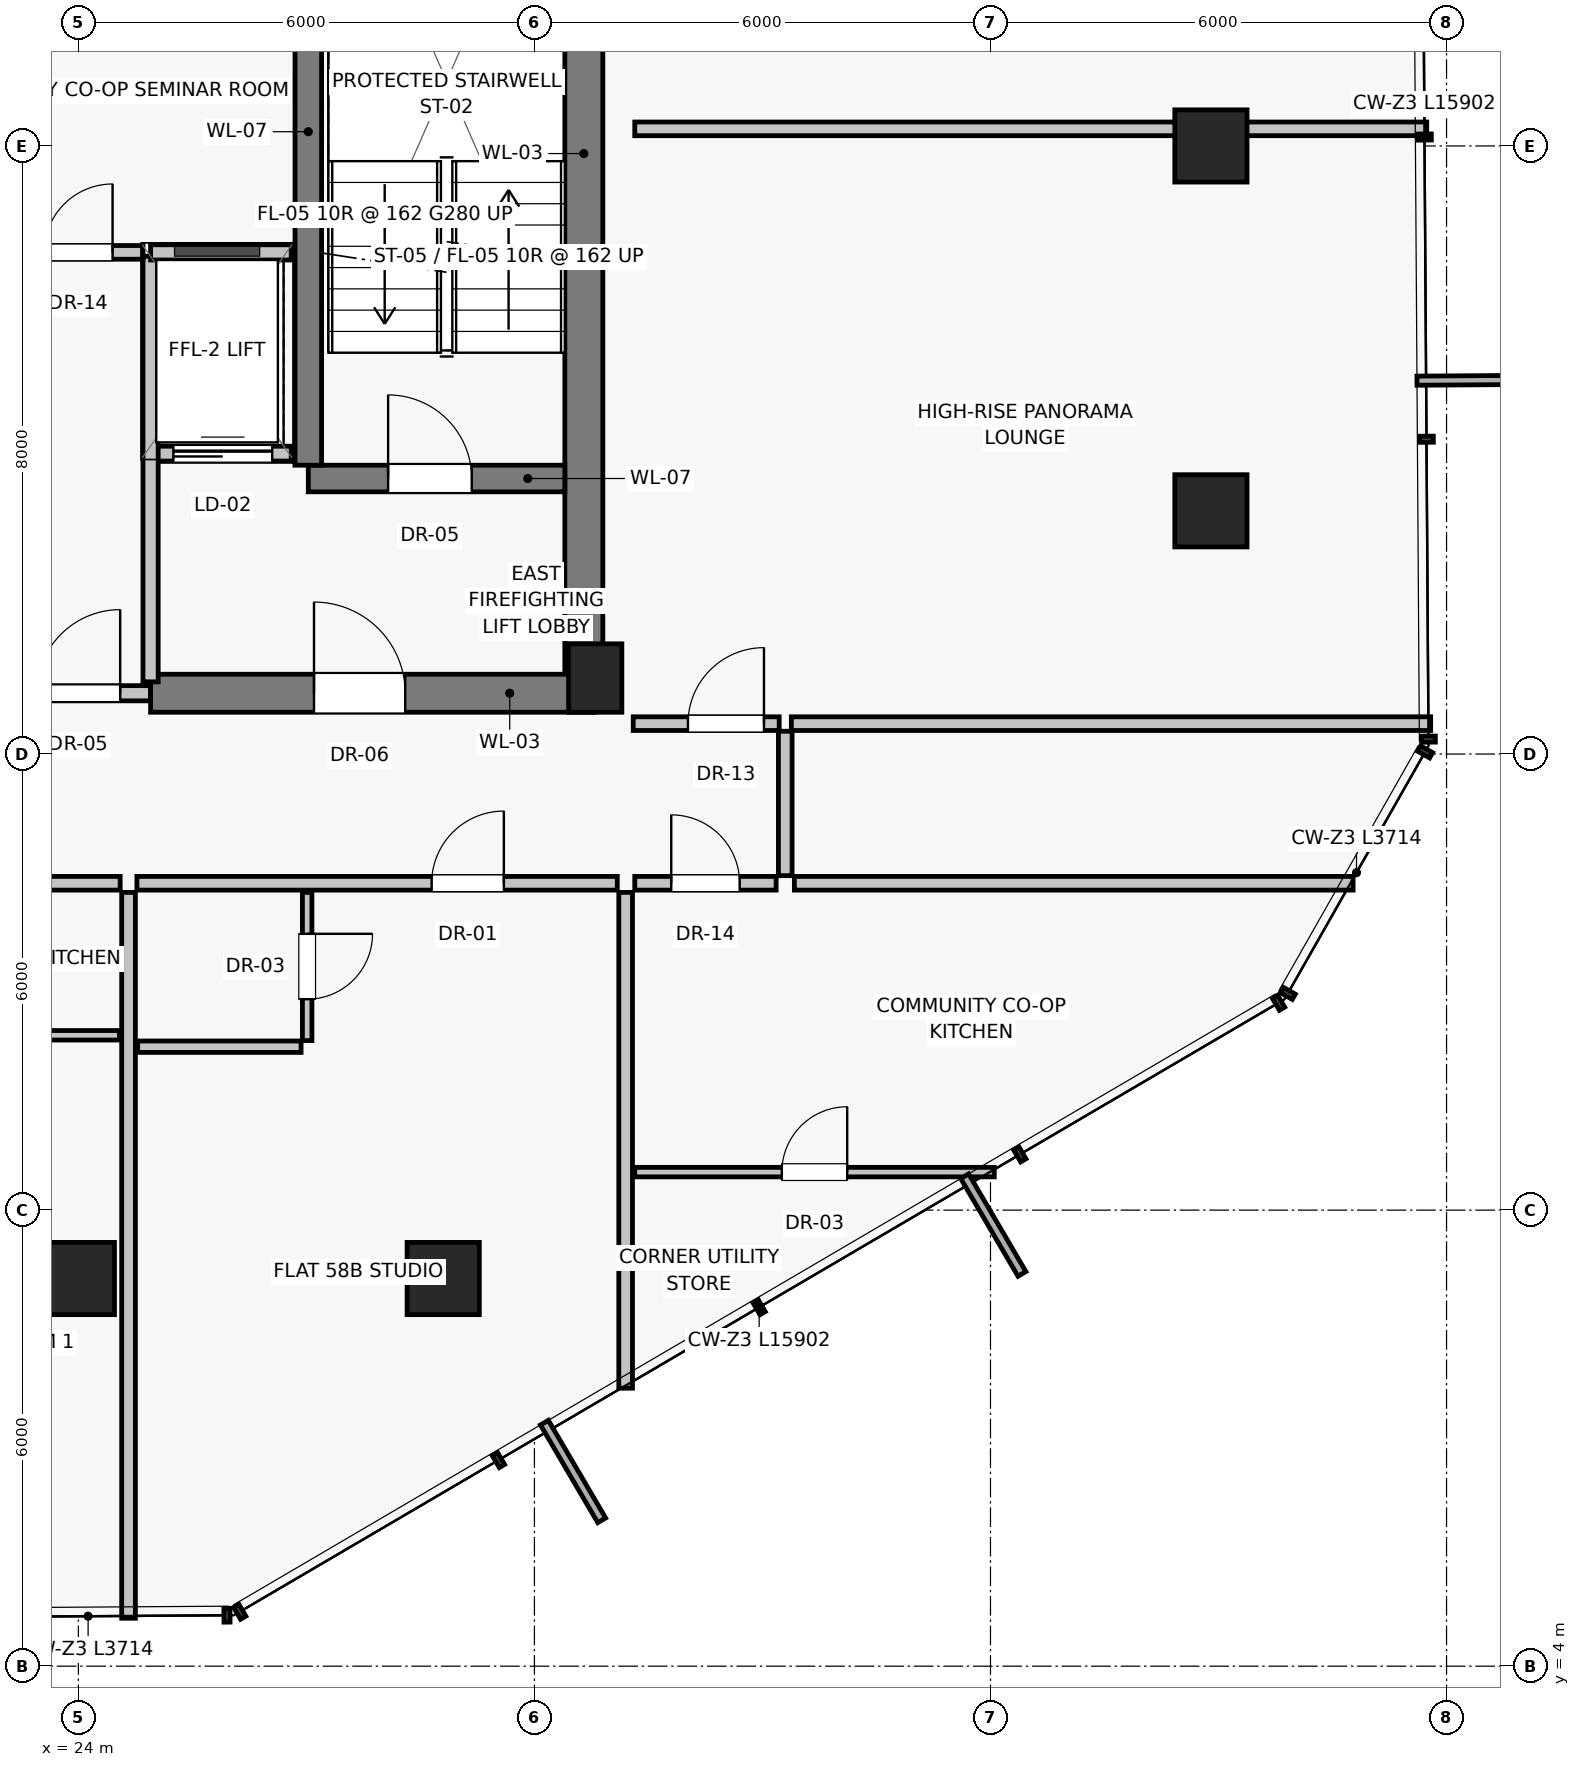
"""IFC4 building model, lengths in metres.
Left out: names, types, materials, properties, quantities, classifications, styles, units other than length and angle.
Written with IfcOpenShell. Run it as: python <this file> out.ifc"""

import sys

from ifc_helpers import new_model, si_unit, direction, frame, frame_2d, origin, origin_2d, place, context, subcontext, project, spatial, rectangle, extrude, source, transform, mapped, element, fill, save


model = new_model("IFC4")
c1 = context("Model", 3, precision=1e-05, world=origin(), true_north=direction((0.0, 1.0)))
c2 = subcontext(c1, "Body", "Model", "MODEL_VIEW")
j1 = project(units=[si_unit("LENGTHUNIT", "METRE"), si_unit("PLANEANGLEUNIT", "RADIAN")], contexts=[c1])
p1 = place(None, origin())
s1 = spatial("IfcSite", under=j1, at=p1, CompositionType="ELEMENT")
p2 = place(p1, origin())
s2 = spatial("IfcBuilding", under=s1, at=p2, CompositionType="ELEMENT")
p3 = place(p2, frame((0.0, 0.0, 204.85)))
s3 = spatial("IfcBuildingStorey", under=s2, at=p3, CompositionType="ELEMENT", Elevation=204.85)
p4 = place(p3, frame((30.8, 17.0, 0.0), z_axis=(0.0, 0.0, 1.0), x_axis=(1.0, 0.0, 0.0)))
e1 = element("IfcColumn", 1, at=p4, inside=s3, PredefinedType="PILASTER", context=c2, shape_type="SweptSolid", body=[
    extrude(rectangle(XDim=0.7, YDim=0.9, at=origin_2d()), origin(), (0.0, 0.0, 1.0), 3.25),
])
for number, where, z_axis, x_axis in (
    (2, (38.9, 19.2, 0.0), (0.0, 0.0, 1.0), (1.0, 0.0, 0.0)),
    (3, (38.9, 24.0, 0.0), (0.0, 0.0, 1.0), (1.0, 0.0, 0.0)),
    (4, (24.0, 9.1, 0.0), (0.0, 0.0, 1.0), (1.0, 0.0, 0.0)),
    (5, (28.8, 9.1, 0.0), (0.0, 0.0, 1.0), (1.0, 0.0, 0.0)),
):
    element("IfcColumn", number, at=place(p3, frame(where, z_axis=z_axis, x_axis=x_axis)), inside=s3, PredefinedType="COLUMN", context=c2, shape_type="SweptSolid", body=[
        extrude(rectangle(XDim=0.95, YDim=0.95, at=origin_2d()), origin(), (0.0, 0.0, 1.0), 3.25),
    ])
p5 = place(p3, frame((30.65, 16.8, 0.0), z_axis=(0.0, 0.0, 1.0), x_axis=(0.0, 1.0, 0.0)))
e6 = element("IfcWall", 6, at=p5, inside=s3, PredefinedType="SHEAR", context=c2, shape_type="SweptSolid", body=[
    extrude(rectangle(XDim=14.2, YDim=0.5, at=frame_2d((7.1, 0.0))), origin(), (0.0, 0.0, 1.0), 3.015),
])
p6 = place(p3, frame((23.05, 16.8, 0.0), z_axis=(0.0, 0.0, 1.0), x_axis=(1.0, 0.0, 0.0)))
e7 = element("IfcWall", 7, at=p6, inside=s3, PredefinedType="SOLIDWALL", context=c2, shape_type="SweptSolid", body=[
    extrude(rectangle(XDim=1.9, YDim=0.2, at=frame_2d((0.95, 0.0))), origin(), (0.0, 0.0, 1.0), 2.165),
])
p7 = place(p6, frame((0.4, 0.0, 0.0)))
e8 = element("IfcOpeningElement", 8, at=p7, cuts=e7, PredefinedType="OPENING", context=c2, shape_type="SweptSolid", body=[
    extrude(rectangle(XDim=1.1, YDim=2.03, at=frame_2d((0.55, 1.015))), frame((0.0, 0.11, 0.0), z_axis=(0.0, -1.0, 0.0), x_axis=(1.0, 0.0, 0.0)), (0.0, 0.0, 1.0), 0.22),
])
p8 = place(p3, frame((24.95, 16.8, 0.0), z_axis=(0.0, 0.0, 1.0), x_axis=(1.0, 0.0, 0.0)))
e9 = element("IfcWall", 9, at=p8, inside=s3, PredefinedType="SHEAR", context=c2, shape_type="SweptSolid", body=[
    extrude(rectangle(XDim=5.85, YDim=0.5, at=frame_2d((2.925, 0.0))), origin(), (0.0, 0.0, 1.0), 3.015),
])
p9 = place(p8, frame((2.15, 0.0, 0.0)))
e10 = element("IfcOpeningElement", 10, at=p9, cuts=e9, PredefinedType="OPENING", context=c2, shape_type="SweptSolid", body=[
    extrude(rectangle(XDim=1.2, YDim=2.03, at=frame_2d((0.6, 1.015))), frame((0.0, 0.26, 0.0), z_axis=(0.0, -1.0, 0.0), x_axis=(1.0, 0.0, 0.0)), (0.0, 0.0, 1.0), 0.52),
])
p10 = place(p3, frame((24.95, 19.95, 0.0), z_axis=(0.0, 0.0, 1.0), x_axis=(1.0, 0.0, 0.0)))
e11 = element("IfcWall", 11, at=p10, inside=s3, PredefinedType="SOLIDWALL", context=c2, shape_type="SweptSolid", body=[
    extrude(rectangle(XDim=1.85, YDim=0.2, at=frame_2d((0.925, 0.0))), origin(), (0.0, 0.0, 1.0), 3.015),
])
p11 = place(p10, frame((0.3, 0.0, 0.0)))
e12 = element("IfcOpeningElement", 12, at=p11, cuts=e11, PredefinedType="OPENING", context=c2, shape_type="SweptSolid", body=[
    extrude(rectangle(XDim=1.3, YDim=2.25, at=frame_2d((0.65, 1.125))), frame((0.0, 0.11, 0.0), z_axis=(0.0, -1.0, 0.0), x_axis=(1.0, 0.0, 0.0)), (0.0, 0.0, 1.0), 0.22),
])
p12 = place(p3, frame((27.025, 19.625, 0.0), z_axis=(0.0, 0.0, 1.0), x_axis=(1.0, 0.0, 0.0)))
e13 = element("IfcWall", 13, at=p12, inside=s3, PredefinedType="SHEAR", context=c2, shape_type="SweptSolid", body=[
    extrude(rectangle(XDim=3.375, YDim=0.35, at=frame_2d((1.688, 0.0))), origin(), (0.0, 0.0, 1.0), 3.015),
])
p13 = place(p12, frame((1.05, 0.0, 0.0)))
e14 = element("IfcOpeningElement", 14, at=p13, cuts=e13, PredefinedType="OPENING", context=c2, shape_type="SweptSolid", body=[
    extrude(rectangle(XDim=1.1, YDim=2.03, at=frame_2d((0.55, 1.015))), frame((0.0, 0.185, 0.0), z_axis=(0.0, -1.0, 0.0), x_axis=(1.0, 0.0, 0.0)), (0.0, 0.0, 1.0), 0.37),
])
p14 = place(p3, frame((27.025, 19.8, 0.0), z_axis=(0.0, 0.0, 1.0), x_axis=(0.0, 1.0, 0.0)))
e15 = element("IfcWall", 15, at=p14, inside=s3, PredefinedType="SHEAR", context=c2, shape_type="SweptSolid", body=[
    extrude(rectangle(XDim=8.775, YDim=0.35, at=frame_2d((4.387, 0.0))), origin(), (0.0, 0.0, 1.0), 3.015),
])
p15 = place(p3, frame((24.95, 16.95, 0.0), z_axis=(0.0, 0.0, 1.0), x_axis=(0.0, 1.0, 0.0)))
e16 = element("IfcWall", 16, at=p15, inside=s3, PredefinedType="SOLIDWALL", context=c2, shape_type="SweptSolid", body=[
    extrude(rectangle(XDim=5.6, YDim=0.2, at=frame_2d((2.8, 0.0))), origin(), (0.0, 0.0, 1.0), 3.015),
])
p16 = place(p3, frame((24.95, 22.6, 0.0), z_axis=(0.0, 0.0, 1.0), x_axis=(1.0, 0.0, 0.0)))
e17 = element("IfcWall", 17, at=p16, inside=s3, PredefinedType="SOLIDWALL", context=c2, shape_type="SweptSolid", body=[
    extrude(rectangle(XDim=1.85, YDim=0.2, at=frame_2d((0.925, 0.0))), origin(), (0.0, 0.0, 1.0), 3.015),
])
p17 = place(p3, frame((23.15, 22.6, 0.0), z_axis=(0.0, 0.0, 1.0), x_axis=(1.0, 0.0, 0.0)))
e18 = element("IfcWall", 18, at=p17, inside=s3, PredefinedType="PARTITIONING", context=c2, shape_type="SweptSolid", body=[
    extrude(rectangle(XDim=1.7, YDim=0.18, at=frame_2d((0.85, 0.0))), origin(), (0.0, 0.0, 1.0), 3.015),
])
p18 = place(p17, frame((0.4, 0.0, 0.0)))
e19 = element("IfcOpeningElement", 19, at=p18, cuts=e18, PredefinedType="OPENING", context=c2, shape_type="SweptSolid", body=[
    extrude(rectangle(XDim=0.9, YDim=2.01, at=frame_2d((0.45, 1.005))), frame((0.0, 0.1, 0.0), z_axis=(0.0, -1.0, 0.0), x_axis=(1.0, 0.0, 0.0)), (0.0, 0.0, 1.0), 0.2),
])
p19 = place(p3, frame((31.2, 14.18, 0.0), z_axis=(0.0, 0.0, 1.0), x_axis=(0.0, -1.0, 0.0)))
e20 = element("IfcWall", 20, at=p19, inside=s3, PredefinedType="PARTITIONING", context=c2, shape_type="SweptSolid", body=[
    extrude(rectangle(XDim=6.523, YDim=0.18, at=frame_2d((3.261, 0.0))), origin(), (0.0, 0.0, 1.0), 3.015),
])
p20 = place(p3, frame((15.31, 14.3, 0.0), z_axis=(0.0, 0.0, 1.0), x_axis=(1.0, 0.0, 0.0)))
e21 = element("IfcWall", 21, at=p20, inside=s3, PredefinedType="PARTITIONING", context=c2, shape_type="SweptSolid", body=[
    extrude(rectangle(XDim=9.24, YDim=0.18, at=frame_2d((4.62, 0.0))), origin(), (0.0, 0.0, 1.0), 3.015),
])
p21 = place(p20, frame((3.142, 0.0, 0.0)))
e22 = element("IfcOpeningElement", 22, at=p21, cuts=e21, PredefinedType="OPENING", context=c2, shape_type="SweptSolid", body=[
    extrude(rectangle(XDim=0.95, YDim=2.02, at=frame_2d((0.475, 1.01))), frame((0.0, 0.1, 0.0), z_axis=(0.0, -1.0, 0.0), x_axis=(1.0, 0.0, 0.0)), (0.0, 0.0, 1.0), 0.2),
])
p22 = place(p3, frame((20.503, 12.3, 0.0), z_axis=(0.0, 0.0, 1.0), x_axis=(1.0, 0.0, 0.0)))
e23 = element("IfcWall", 23, at=p22, inside=s3, PredefinedType="PARTITIONING", context=c2, shape_type="SweptSolid", body=[
    extrude(rectangle(XDim=4.037, YDim=0.125, at=frame_2d((2.019, 0.0))), origin(), (0.0, 0.0, 1.0), 3.015),
])
p23 = place(p3, frame((24.66, 14.18, 0.0), z_axis=(0.0, 0.0, 1.0), x_axis=(0.0, -1.0, 0.0)))
e24 = element("IfcWall", 24, at=p23, inside=s3, PredefinedType="PARTITIONING", context=c2, shape_type="SweptSolid", body=[
    extrude(rectangle(XDim=9.549, YDim=0.18, at=frame_2d((4.774, 0.0))), origin(), (0.0, 0.0, 1.0), 3.015),
])
p24 = place(p3, frame((24.77, 14.3, 0.0), z_axis=(0.0, 0.0, 1.0), x_axis=(1.0, 0.0, 0.0)))
e25 = element("IfcWall", 25, at=p24, inside=s3, PredefinedType="PARTITIONING", context=c2, shape_type="SweptSolid", body=[
    extrude(rectangle(XDim=6.32, YDim=0.18, at=frame_2d((3.16, 0.0))), origin(), (0.0, 0.0, 1.0), 3.015),
])
p25 = place(p24, frame((3.878, 0.0, 0.0)))
e26 = element("IfcOpeningElement", 26, at=p25, cuts=e25, PredefinedType="OPENING", context=c2, shape_type="SweptSolid", body=[
    extrude(rectangle(XDim=0.95, YDim=2.02, at=frame_2d((0.475, 1.01))), frame((0.0, 0.1, 0.0), z_axis=(0.0, -1.0, 0.0), x_axis=(1.0, 0.0, 0.0)), (0.0, 0.0, 1.0), 0.2),
])
p26 = place(p3, frame((27.01, 14.18, 0.0), z_axis=(0.0, 0.0, 1.0), x_axis=(0.0, -1.0, 0.0)))
e27 = element("IfcWall", 27, at=p26, inside=s3, PredefinedType="PARTITIONING", context=c2, shape_type="SweptSolid", body=[
    extrude(rectangle(XDim=1.95, YDim=0.125, at=frame_2d((0.975, 0.0))), origin(), (0.0, 0.0, 1.0), 3.015),
])
p27 = place(p26, frame((0.545, 0.0, 0.0)))
e28 = element("IfcOpeningElement", 28, at=p27, cuts=e27, PredefinedType="OPENING", context=c2, shape_type="SweptSolid", body=[
    extrude(rectangle(XDim=0.86, YDim=2.01, at=frame_2d((0.43, 1.005))), frame((0.0, 0.073, 0.0), z_axis=(0.0, -1.0, 0.0), x_axis=(1.0, 0.0, 0.0)), (0.0, 0.0, 1.0), 0.145),
])
p28 = place(p3, frame((24.78, 12.15, 0.0), z_axis=(0.0, 0.0, 1.0), x_axis=(1.0, 0.0, 0.0)))
e29 = element("IfcWall", 29, at=p28, inside=s3, PredefinedType="PARTITIONING", context=c2, shape_type="SweptSolid", body=[
    extrude(rectangle(XDim=2.15, YDim=0.15, at=frame_2d((1.075, 0.0))), origin(), (0.0, 0.0, 1.0), 3.015),
])
p29 = place(p3, frame((31.32, 24.225, 0.0), z_axis=(0.0, 0.0, 1.0), x_axis=(1.0, 0.0, 0.0)))
e30 = element("IfcWall", 30, at=p29, inside=s3, PredefinedType="PARTITIONING", context=c2, shape_type="SweptSolid", body=[
    extrude(rectangle(XDim=10.419, YDim=0.18, at=frame_2d((5.209, 0.0))), origin(), (0.0, 0.0, 1.0), 3.015),
])
p30 = place(p3, frame((33.3, 14.4, 0.0), z_axis=(0.0, 0.0, 1.0), x_axis=(0.0, 1.0, 0.0)))
e31 = element("IfcWall", 31, at=p30, inside=s3, PredefinedType="PARTITIONING", context=c2, shape_type="SweptSolid", body=[
    extrude(rectangle(XDim=1.9, YDim=0.18, at=frame_2d((0.95, 0.0))), origin(), (0.0, 0.0, 1.0), 3.015),
])
p31 = place(p3, frame((31.3, 16.4, 0.0), z_axis=(0.0, 0.0, 1.0), x_axis=(1.0, 0.0, 0.0)))
e32 = element("IfcWall", 32, at=p31, inside=s3, PredefinedType="PARTITIONING", context=c2, shape_type="SweptSolid", body=[
    extrude(rectangle(XDim=1.92, YDim=0.18, at=frame_2d((0.96, 0.0))), origin(), (0.0, 0.0, 1.0), 3.015),
])
p32 = place(p31, frame((0.72, 0.0, 0.0)))
e33 = element("IfcOpeningElement", 33, at=p32, cuts=e32, PredefinedType="OPENING", context=c2, shape_type="SweptSolid", body=[
    extrude(rectangle(XDim=1.0, YDim=2.01, at=frame_2d((0.5, 1.005))), frame((0.0, 0.1, 0.0), z_axis=(0.0, -1.0, 0.0), x_axis=(1.0, 0.0, 0.0)), (0.0, 0.0, 1.0), 0.2),
])
p33 = place(p3, frame((33.38, 16.4, 0.0), z_axis=(0.0, 0.0, 1.0), x_axis=(1.0, 0.0, 0.0)))
e34 = element("IfcWall", 34, at=p33, inside=s3, PredefinedType="PARTITIONING", context=c2, shape_type="SweptSolid", body=[
    extrude(rectangle(XDim=8.411, YDim=0.18, at=frame_2d((4.206, 0.0))), origin(), (0.0, 0.0, 1.0), 3.015),
])
p34 = place(p3, frame((33.42, 14.3, 0.0), z_axis=(0.0, 0.0, 1.0), x_axis=(1.0, 0.0, 0.0)))
e35 = element("IfcWall", 35, at=p34, inside=s3, PredefinedType="PARTITIONING", context=c2, shape_type="SweptSolid", body=[
    extrude(rectangle(XDim=7.351, YDim=0.18, at=frame_2d((3.675, 0.0))), origin(), (0.0, 0.0, 1.0), 3.015),
])
p35 = place(p3, frame((31.32, 14.3, 0.0), z_axis=(0.0, 0.0, 1.0), x_axis=(1.0, 0.0, 0.0)))
e36 = element("IfcWall", 36, at=p35, inside=s3, PredefinedType="PARTITIONING", context=c2, shape_type="SweptSolid", body=[
    extrude(rectangle(XDim=1.86, YDim=0.18, at=frame_2d((0.93, 0.0))), origin(), (0.0, 0.0, 1.0), 3.015),
])
p36 = place(p35, frame((0.48, 0.0, 0.0)))
e37 = element("IfcOpeningElement", 37, at=p36, cuts=e36, PredefinedType="OPENING", context=c2, shape_type="SweptSolid", body=[
    extrude(rectangle(XDim=0.9, YDim=2.01, at=frame_2d((0.45, 1.005))), frame((0.0, 0.1, 0.0), z_axis=(0.0, -1.0, 0.0), x_axis=(1.0, 0.0, 0.0)), (0.0, 0.0, 1.0), 0.2),
])
p37 = place(p3, frame((31.32, 10.5, 0.0), z_axis=(0.0, 0.0, 1.0), x_axis=(1.0, 0.0, 0.0)))
e38 = element("IfcWall", 38, at=p37, inside=s3, PredefinedType="PARTITIONING", context=c2, shape_type="SweptSolid", body=[
    extrude(rectangle(XDim=4.729, YDim=0.125, at=frame_2d((2.365, 0.0))), origin(), (0.0, 0.0, 1.0), 3.015),
])
p38 = place(p37, frame((1.935, 0.0, 0.0)))
e39 = element("IfcOpeningElement", 39, at=p38, cuts=e38, PredefinedType="OPENING", context=c2, shape_type="SweptSolid", body=[
    extrude(rectangle(XDim=0.86, YDim=2.01, at=frame_2d((0.43, 1.005))), frame((0.0, 0.073, 0.0), z_axis=(0.0, -1.0, 0.0), x_axis=(1.0, 0.0, 0.0)), (0.0, 0.0, 1.0), 0.145),
])
m1 = source(origin(), c2, "Body", "SweptSolid", [
    extrude(rectangle(XDim=1.1, YDim=2.03, at=frame_2d((0.55, 1.015))), frame((0.0, 0.025, 0.0), z_axis=(0.0, -1.0, 0.0), x_axis=(1.0, 0.0, 0.0)), (0.0, 0.0, 1.0), 0.05),
])
p39 = place(p7, origin())
e40 = element("IfcDoor", 40, at=p39, inside=s3, OperationType="SINGLE_SWING_RIGHT", PredefinedType="DOOR", context=c2, shape_type="MappedRepresentation", body=[
    mapped(m1, transform((0.0, 0.0, 0.0), scale=1.0)),
])
fill(e8, e40)
m2 = source(origin(), c2, "Body", "SweptSolid", [
    extrude(rectangle(XDim=1.2, YDim=2.03, at=frame_2d((0.6, 1.015))), frame((0.0, 0.025, 0.0), z_axis=(0.0, -1.0, 0.0), x_axis=(1.0, 0.0, 0.0)), (0.0, 0.0, 1.0), 0.05),
])
p40 = place(p9, origin())
e41 = element("IfcDoor", 41, at=p40, inside=s3, OperationType="SINGLE_SWING_LEFT", PredefinedType="DOOR", context=c2, shape_type="MappedRepresentation", body=[
    mapped(m2, transform((0.0, 0.0, 0.0), scale=1.0)),
])
fill(e10, e41)
m3 = source(origin(), c2, "Body", "SweptSolid", [
    extrude(rectangle(XDim=1.3, YDim=2.25, at=frame_2d((0.65, 1.125))), frame((0.0, 0.025, 0.0), z_axis=(0.0, -1.0, 0.0), x_axis=(1.0, 0.0, 0.0)), (0.0, 0.0, 1.0), 0.05),
])
p41 = place(p11, origin())
e42 = element("IfcDoor", 42, at=p41, inside=s3, OperationType="SLIDING_TO_LEFT", PredefinedType="DOOR", context=c2, shape_type="MappedRepresentation", body=[
    mapped(m3, transform((0.0, 0.0, 0.0), scale=1.0)),
])
fill(e12, e42)
p42 = place(p13, origin())
e43 = element("IfcDoor", 43, at=p42, inside=s3, OperationType="SINGLE_SWING_LEFT", PredefinedType="DOOR", context=c2, shape_type="MappedRepresentation", body=[
    mapped(m1, transform((0.0, 0.0, 0.0), scale=1.0)),
])
fill(e14, e43)
m4 = source(origin(), c2, "Body", "SweptSolid", [
    extrude(rectangle(XDim=0.9, YDim=2.01, at=frame_2d((0.45, 1.005))), frame((0.0, 0.025, 0.0), z_axis=(0.0, -1.0, 0.0), x_axis=(1.0, 0.0, 0.0)), (0.0, 0.0, 1.0), 0.05),
])
p43 = place(p18, origin())
e44 = element("IfcDoor", 44, at=p43, inside=s3, OperationType="SINGLE_SWING_RIGHT", PredefinedType="DOOR", context=c2, shape_type="MappedRepresentation", body=[
    mapped(m4, transform((0.0, 0.0, 0.0), scale=1.0)),
])
fill(e19, e44)
m5 = source(origin(), c2, "Body", "SweptSolid", [
    extrude(rectangle(XDim=0.95, YDim=2.02, at=frame_2d((0.475, 1.01))), frame((0.0, 0.025, 0.0), z_axis=(0.0, -1.0, 0.0), x_axis=(1.0, 0.0, 0.0)), (0.0, 0.0, 1.0), 0.05),
])
p44 = place(p25, origin())
e45 = element("IfcDoor", 45, at=p44, inside=s3, OperationType="SINGLE_SWING_RIGHT", PredefinedType="DOOR", context=c2, shape_type="MappedRepresentation", body=[
    mapped(m5, transform((0.0, 0.0, 0.0), scale=1.0)),
])
fill(e26, e45)
m6 = source(origin(), c2, "Body", "SweptSolid", [
    extrude(rectangle(XDim=0.86, YDim=2.01, at=frame_2d((0.43, 1.005))), frame((0.0, 0.025, 0.0), z_axis=(0.0, -1.0, 0.0), x_axis=(1.0, 0.0, 0.0)), (0.0, 0.0, 1.0), 0.05),
])
p45 = place(p27, origin())
e46 = element("IfcDoor", 46, at=p45, inside=s3, OperationType="SINGLE_SWING_LEFT", PredefinedType="DOOR", context=c2, shape_type="MappedRepresentation", body=[
    mapped(m6, transform((0.0, 0.0, 0.0), scale=1.0)),
])
fill(e28, e46)
m7 = source(origin(), c2, "Body", "SweptSolid", [
    extrude(rectangle(XDim=1.0, YDim=2.01, at=frame_2d((0.5, 1.005))), frame((0.0, 0.025, 0.0), z_axis=(0.0, -1.0, 0.0), x_axis=(1.0, 0.0, 0.0)), (0.0, 0.0, 1.0), 0.05),
])
p46 = place(p32, origin())
e47 = element("IfcDoor", 47, at=p46, inside=s3, OperationType="SINGLE_SWING_RIGHT", PredefinedType="DOOR", context=c2, shape_type="MappedRepresentation", body=[
    mapped(m7, transform((0.0, 0.0, 0.0), scale=1.0)),
])
fill(e33, e47)
p47 = place(p36, origin())
e48 = element("IfcDoor", 48, at=p47, inside=s3, OperationType="SINGLE_SWING_LEFT", PredefinedType="DOOR", context=c2, shape_type="MappedRepresentation", body=[
    mapped(m4, transform((0.0, 0.0, 0.0), scale=1.0)),
])
fill(e37, e48)
p48 = place(p38, origin())
e49 = element("IfcDoor", 49, at=p48, inside=s3, OperationType="SINGLE_SWING_RIGHT", PredefinedType="DOOR", context=c2, shape_type="MappedRepresentation", body=[
    mapped(m6, transform((0.0, 0.0, 0.0), scale=1.0)),
])
fill(e39, e49)
save(model, sys.argv[1])
